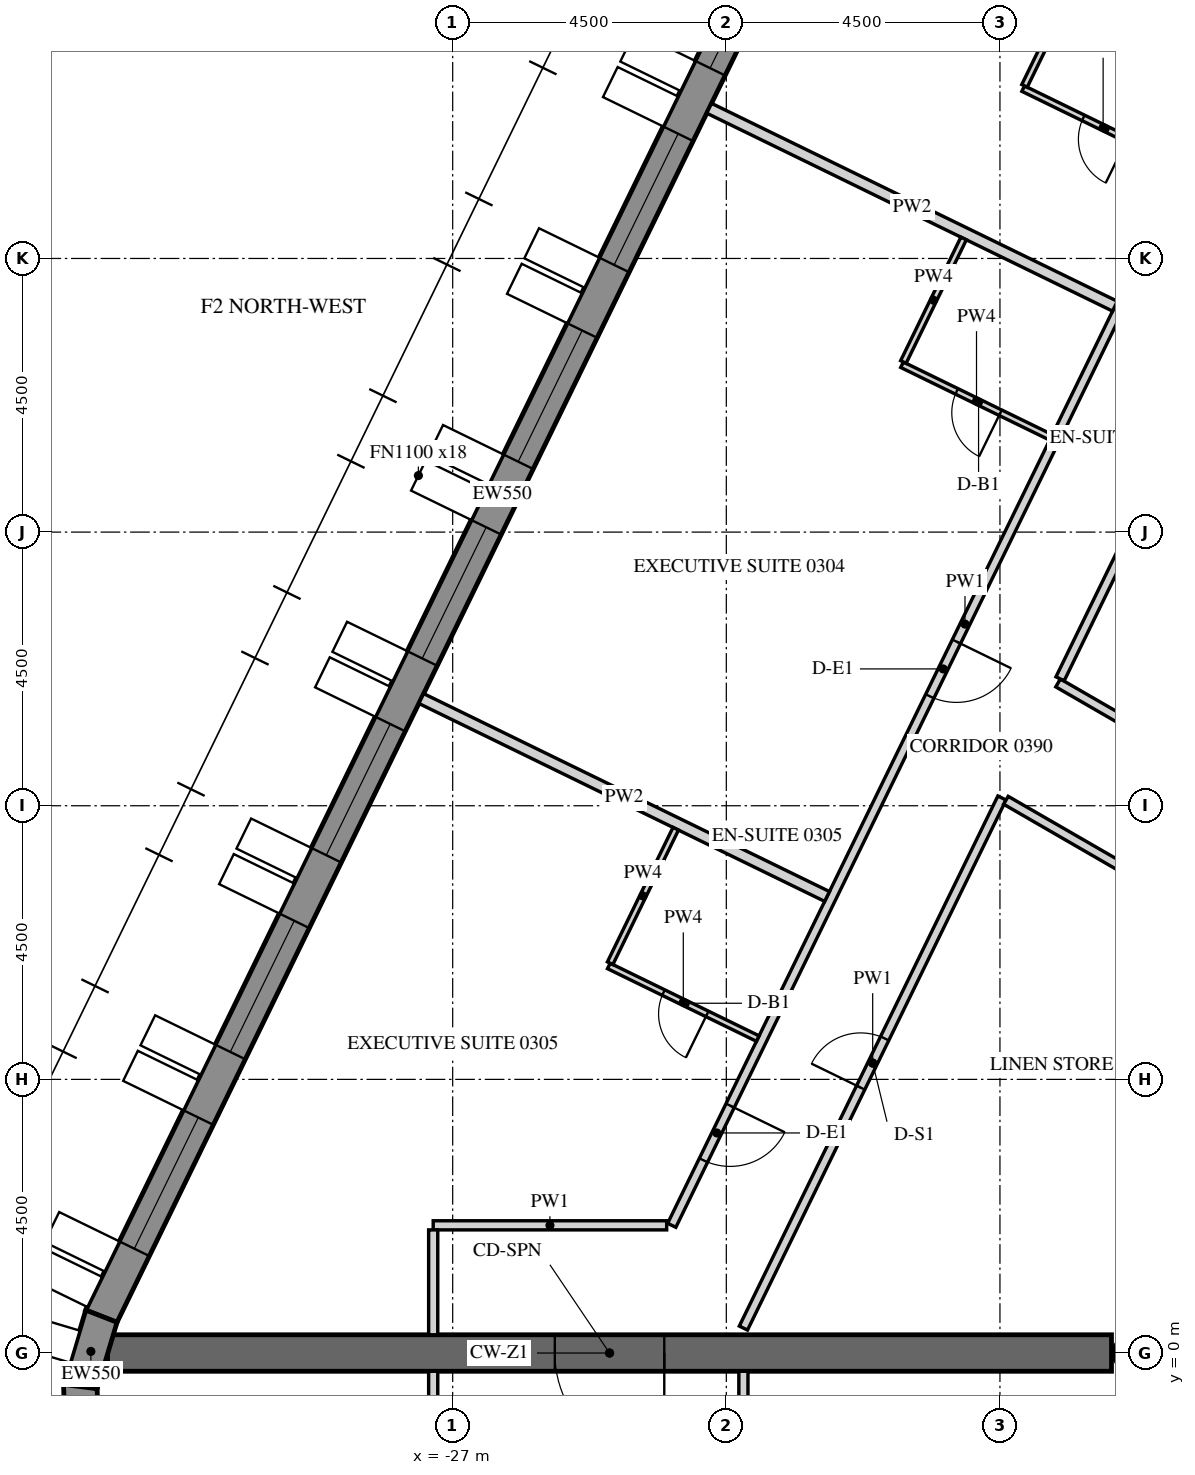
"""IFC4 building model, lengths in metres.
Left out: names, types, materials, properties, quantities, classifications, styles, units other than length and angle.
Written with IfcOpenShell. Run it as: python <this file> out.ifc"""

import sys

from ifc_helpers import new_model, si_unit, direction, frame, frame_2d, origin, place, context, subcontext, project, spatial, polyline, rectangle, outline, extrude, element, fill, save


model = new_model("IFC4")
c1 = context("Model", 3, precision=1e-05, world=origin(), true_north=direction((0.0, 1.0)))
c2 = subcontext(c1, "Body", "Model", "MODEL_VIEW")
j1 = project(units=[si_unit("LENGTHUNIT", "METRE"), si_unit("PLANEANGLEUNIT", "RADIAN")], contexts=[c1])
p1 = place(None, origin())
s1 = spatial("IfcSite", under=j1, at=p1, CompositionType="ELEMENT")
p2 = place(p1, origin())
s2 = spatial("IfcBuilding", under=s1, at=p2, CompositionType="ELEMENT")
p3 = place(p2, frame((0.0, 0.0, 60.9)))
s3 = spatial("IfcBuildingStorey", under=s2, at=p3, CompositionType="ELEMENT", Elevation=60.9)
p4 = place(p3, frame((-19.595, 27.633, -0.15), z_axis=(0.0, 0.0, 1.0), x_axis=(-0.438368285794, -0.898795441694, 0.0)))
e1 = element("IfcWall", 1, at=p4, inside=s3, PredefinedType="SOLIDWALL", context=c2, shape_type="SweptSolid", body=[
    extrude(outline(polyline([(-0.026, -0.275), (30.093, -0.275), (30.048, 0.275), (0.026, 0.275), (-0.026, -0.275)])), origin(), (0.0, 0.0, 1.0), 3.9),
])
p5 = place(p4, frame((1.236, 0.0, 1.05)))
e2 = element("IfcOpeningElement", 2, at=p5, cuts=e1, PredefinedType="OPENING", context=c2, shape_type="SweptSolid", body=[
    extrude(rectangle(XDim=2.4, YDim=2.4, at=frame_2d((1.2, 1.2))), frame((0.0, 0.285, 0.0), z_axis=(0.0, -1.0, 0.0), x_axis=(1.0, 0.0, 0.0)), (0.0, 0.0, 1.0), 0.57),
])
p6 = place(p4, frame((4.835, 0.0, 1.05)))
e3 = element("IfcOpeningElement", 3, at=p6, cuts=e1, PredefinedType="OPENING", context=c2, shape_type="SweptSolid", body=[
    extrude(rectangle(XDim=2.4, YDim=2.4, at=frame_2d((1.2, 1.2))), frame((0.0, 0.285, 0.0), z_axis=(0.0, -1.0, 0.0), x_axis=(1.0, 0.0, 0.0)), (0.0, 0.0, 1.0), 0.57),
])
p7 = place(p4, frame((8.436, 0.0, 1.05)))
e4 = element("IfcOpeningElement", 4, at=p7, cuts=e1, PredefinedType="OPENING", context=c2, shape_type="SweptSolid", body=[
    extrude(rectangle(XDim=2.4, YDim=2.4, at=frame_2d((1.2, 1.2))), frame((0.0, 0.285, 0.0), z_axis=(0.0, -1.0, 0.0), x_axis=(1.0, 0.0, 0.0)), (0.0, 0.0, 1.0), 0.57),
])
p8 = place(p4, frame((12.035, 0.0, 1.05)))
e5 = element("IfcOpeningElement", 5, at=p8, cuts=e1, PredefinedType="OPENING", context=c2, shape_type="SweptSolid", body=[
    extrude(rectangle(XDim=2.4, YDim=2.4, at=frame_2d((1.2, 1.2))), frame((0.0, 0.285, 0.0), z_axis=(0.0, -1.0, 0.0), x_axis=(1.0, 0.0, 0.0)), (0.0, 0.0, 1.0), 0.57),
])
p9 = place(p4, frame((15.635, 0.0, 1.05)))
e6 = element("IfcOpeningElement", 6, at=p9, cuts=e1, PredefinedType="OPENING", context=c2, shape_type="SweptSolid", body=[
    extrude(rectangle(XDim=2.4, YDim=2.4, at=frame_2d((1.2, 1.2))), frame((0.0, 0.285, 0.0), z_axis=(0.0, -1.0, 0.0), x_axis=(1.0, 0.0, 0.0)), (0.0, 0.0, 1.0), 0.57),
])
p10 = place(p4, frame((19.236, 0.0, 1.05)))
e7 = element("IfcOpeningElement", 7, at=p10, cuts=e1, PredefinedType="OPENING", context=c2, shape_type="SweptSolid", body=[
    extrude(rectangle(XDim=2.4, YDim=2.4, at=frame_2d((1.2, 1.2))), frame((0.0, 0.285, 0.0), z_axis=(0.0, -1.0, 0.0), x_axis=(1.0, 0.0, 0.0)), (0.0, 0.0, 1.0), 0.57),
])
p11 = place(p4, frame((22.835, 0.0, 1.05)))
e8 = element("IfcOpeningElement", 8, at=p11, cuts=e1, PredefinedType="OPENING", context=c2, shape_type="SweptSolid", body=[
    extrude(rectangle(XDim=2.4, YDim=2.4, at=frame_2d((1.2, 1.2))), frame((0.0, 0.285, 0.0), z_axis=(0.0, -1.0, 0.0), x_axis=(1.0, 0.0, 0.0)), (0.0, 0.0, 1.0), 0.57),
])
p12 = place(p4, frame((26.436, 0.0, 1.05)))
e9 = element("IfcOpeningElement", 9, at=p12, cuts=e1, PredefinedType="OPENING", context=c2, shape_type="SweptSolid", body=[
    extrude(rectangle(XDim=2.4, YDim=2.4, at=frame_2d((1.2, 1.2))), frame((0.0, 0.285, 0.0), z_axis=(0.0, -1.0, 0.0), x_axis=(1.0, 0.0, 0.0)), (0.0, 0.0, 1.0), 0.57),
])
p13 = place(p3, frame((-32.777, 0.605, -0.15), z_axis=(0.0, 0.0, 1.0), x_axis=(-0.286921497463, -0.957954098219, 0.0)))
e10 = element("IfcWall", 10, at=p13, inside=s3, PredefinedType="SOLIDWALL", context=c2, shape_type="SweptSolid", body=[
    extrude(outline(polyline([(-0.022, -0.275), (1.253, -0.275), (1.163, 0.275), (0.022, 0.275), (-0.022, -0.275)])), origin(), (0.0, 0.0, 1.0), 3.9),
])
p14 = place(p3, frame((-33.124, -0.552, -0.15), z_axis=(0.0, 0.0, 1.0), x_axis=(0.03495638276, -0.999388838893, 0.0)))
e11 = element("IfcWall", 11, at=p14, inside=s3, PredefinedType="SOLIDWALL", context=c2, shape_type="SweptSolid", body=[
    extrude(outline(polyline([(-0.045, -0.275), (1.253, -0.275), (1.163, 0.275), (0.045, 0.275), (-0.045, -0.275)])), origin(), (0.0, 0.0, 1.0), 3.9),
])
p15 = place(p3, frame((-7.91, 13.7, -0.15), z_axis=(0.0, 0.0, 1.0), x_axis=(-0.499999880136, -0.866025472988, 0.0)))
e12 = element("IfcWall", 12, at=p15, inside=s3, PredefinedType="SHEAR", context=c2, shape_type="SweptSolid", body=[
    extrude(outline(polyline([(-0.173, -0.3), (15.993, -0.3), (15.646, 0.3), (0.173, 0.3), (-0.173, -0.3)])), origin(), (0.0, 0.0, 1.0), 3.9),
])
p16 = place(p15, frame((7.039, 0.0, 0.15)))
e13 = element("IfcOpeningElement", 13, at=p16, cuts=e12, PredefinedType="OPENING", context=c2, shape_type="SweptSolid", body=[
    extrude(rectangle(XDim=1.8, YDim=2.4, at=frame_2d((0.9, 1.2))), frame((0.0, 0.31, 0.0), z_axis=(0.0, -1.0, 0.0), x_axis=(1.0, 0.0, 0.0)), (0.0, 0.0, 1.0), 0.62),
])
p17 = place(p3, frame((-15.819, 0.0, -0.15), z_axis=(0.0, 0.0, 1.0), x_axis=(0.499999880136, -0.866025472988, 0.0)))
e14 = element("IfcWall", 14, at=p17, inside=s3, PredefinedType="SHEAR", context=c2, shape_type="SweptSolid", body=[
    extrude(outline(polyline([(-0.173, -0.3), (15.993, -0.3), (15.646, 0.3), (0.173, 0.3), (-0.173, -0.3)])), origin(), (0.0, 0.0, 1.0), 3.9),
])
p18 = place(p17, frame((6.981, 0.0, 0.15)))
e15 = element("IfcOpeningElement", 15, at=p18, cuts=e14, PredefinedType="OPENING", context=c2, shape_type="SweptSolid", body=[
    extrude(rectangle(XDim=1.8, YDim=2.4, at=frame_2d((0.9, 1.2))), frame((0.0, 0.31, 0.0), z_axis=(0.0, -1.0, 0.0), x_axis=(1.0, 0.0, 0.0)), (0.0, 0.0, 1.0), 0.62),
])
p19 = place(p3, frame((-16.166, 0.0, -0.15), z_axis=(0.0, 0.0, 1.0), x_axis=(-1.0, 0.0, 0.0)))
e16 = element("IfcWall", 16, at=p19, inside=s3, PredefinedType="SHEAR", context=c2, shape_type="SweptSolid", body=[
    extrude(rectangle(XDim=16.509, YDim=0.6, at=frame_2d((8.254, 0.0))), origin(), (0.0, 0.0, 1.0), 3.9),
])
p20 = place(p19, frame((7.354, 0.0, 0.15)))
e17 = element("IfcOpeningElement", 17, at=p20, cuts=e16, PredefinedType="OPENING", context=c2, shape_type="SweptSolid", body=[
    extrude(rectangle(XDim=1.8, YDim=2.4, at=frame_2d((0.9, 1.2))), frame((0.0, 0.31, 0.0), z_axis=(0.0, -1.0, 0.0), x_axis=(1.0, 0.0, 0.0)), (0.0, 0.0, 1.0), 0.62),
])
p21 = place(p3, frame((-13.752, 21.875, 0.0), z_axis=(0.0, 0.0, 1.0), x_axis=(-0.438376846054, -0.898791266559, 0.0)))
e18 = element("IfcWall", 18, at=p21, inside=s3, PredefinedType="PARTITIONING", context=c2, shape_type="SweptSolid", body=[
    extrude(rectangle(XDim=22.002, YDim=0.15, at=frame_2d((11.001, 0.0))), origin(), (0.0, 0.0, 1.0), 2.988),
])
p22 = place(p21, frame((3.269, 0.0, 0.0)))
e19 = element("IfcOpeningElement", 19, at=p22, cuts=e18, PredefinedType="OPENING", context=c2, shape_type="SweptSolid", body=[
    extrude(rectangle(XDim=1.0, YDim=2.1, at=frame_2d((0.5, 1.05))), frame((0.0, 0.085, 0.0), z_axis=(0.0, -1.0, 0.0), x_axis=(1.0, 0.0, 0.0)), (0.0, 0.0, 1.0), 0.17),
])
p23 = place(p21, frame((11.321, 0.0, 0.0)))
e20 = element("IfcOpeningElement", 20, at=p23, cuts=e18, PredefinedType="OPENING", context=c2, shape_type="SweptSolid", body=[
    extrude(rectangle(XDim=1.0, YDim=2.1, at=frame_2d((0.5, 1.05))), frame((0.0, 0.085, 0.0), z_axis=(0.0, -1.0, 0.0), x_axis=(1.0, 0.0, 0.0)), (0.0, 0.0, 1.0), 0.17),
])
p24 = place(p21, frame((19.812, 0.0, 0.0)))
e21 = element("IfcOpeningElement", 21, at=p24, cuts=e18, PredefinedType="OPENING", context=c2, shape_type="SweptSolid", body=[
    extrude(rectangle(XDim=1.0, YDim=2.1, at=frame_2d((0.5, 1.05))), frame((0.0, 0.085, 0.0), z_axis=(0.0, -1.0, 0.0), x_axis=(1.0, 0.0, 0.0)), (0.0, 0.0, 1.0), 0.17),
])
p25 = place(p3, frame((-23.481, 2.1, 0.0), z_axis=(0.0, 0.0, 1.0), x_axis=(-1.0, 0.0, 0.0)))
e22 = element("IfcWall", 22, at=p25, inside=s3, PredefinedType="PARTITIONING", context=c2, shape_type="SweptSolid", body=[
    extrude(rectangle(XDim=3.84, YDim=0.15, at=frame_2d((1.92, 0.0))), origin(), (0.0, 0.0, 1.0), 2.988),
])
p26 = place(p3, frame((-27.32, 2.025, 0.0), z_axis=(0.0, 0.0, 1.0), x_axis=(0.0, -1.0, 0.0)))
e23 = element("IfcWall", 23, at=p26, inside=s3, PredefinedType="PARTITIONING", context=c2, shape_type="SweptSolid", body=[
    extrude(rectangle(XDim=1.725, YDim=0.15, at=frame_2d((0.862, 0.0))), origin(), (0.0, 0.0, 1.0), 2.988),
])
p27 = place(p3, frame((-11.614, 7.884, 0.0), z_axis=(0.0, 0.0, 1.0), x_axis=(-0.866025438137, 0.4999999405, 0.0)))
e24 = element("IfcWall", 24, at=p27, inside=s3, PredefinedType="PARTITIONING", context=c2, shape_type="SweptSolid", body=[
    extrude(rectangle(XDim=6.271, YDim=0.15, at=frame_2d((3.135, 0.0))), origin(), (0.0, 0.0, 1.0), 2.988),
])
p28 = place(p3, frame((-17.011, 11.087, 0.0), z_axis=(0.0, 0.0, 1.0), x_axis=(0.43836877185, 0.898795204631, 0.0)))
e25 = element("IfcWall", 25, at=p28, inside=s3, PredefinedType="PARTITIONING", context=c2, shape_type="SweptSolid", body=[
    extrude(rectangle(XDim=10.083, YDim=0.15, at=frame_2d((5.042, 0.0))), origin(), (0.0, 0.0, 1.0), 2.988),
])
p29 = place(p3, frame((-22.219, 0.41, 0.0), z_axis=(0.0, 0.0, 1.0), x_axis=(0.438391891827, 0.898783927972, 0.0)))
e26 = element("IfcWall", 26, at=p29, inside=s3, PredefinedType="PARTITIONING", context=c2, shape_type="SweptSolid", body=[
    extrude(rectangle(XDim=9.699, YDim=0.15, at=frame_2d((4.85, 0.0))), origin(), (0.0, 0.0, 1.0), 2.988),
])
p30 = place(p29, frame((4.4, 0.0, 0.0)))
e27 = element("IfcOpeningElement", 27, at=p30, cuts=e26, PredefinedType="OPENING", context=c2, shape_type="SweptSolid", body=[
    extrude(rectangle(XDim=0.9, YDim=2.1, at=frame_2d((0.45, 1.05))), frame((0.0, 0.085, 0.0), z_axis=(0.0, -1.0, 0.0), x_axis=(1.0, 0.0, 0.0)), (0.0, 0.0, 1.0), 0.17),
])
p31 = place(p3, frame((-17.902, 9.09, 0.0), z_axis=(0.0, 0.0, 1.0), x_axis=(0.866036368755, -0.499981007633, 0.0)))
e28 = element("IfcWall", 28, at=p31, inside=s3, PredefinedType="PARTITIONING", context=c2, shape_type="SweptSolid", body=[
    extrude(rectangle(XDim=6.049, YDim=0.15, at=frame_2d((3.024, 0.0))), origin(), (0.0, 0.0, 1.0), 2.988),
])
p32 = place(p3, frame((-27.32, -0.3, 0.0), z_axis=(0.0, 0.0, 1.0), x_axis=(0.0, -1.0, 0.0)))
e29 = element("IfcWall", 29, at=p32, inside=s3, PredefinedType="PARTITIONING", context=c2, shape_type="SweptSolid", body=[
    extrude(rectangle(XDim=1.8, YDim=0.15, at=frame_2d((0.9, 0.0))), origin(), (0.0, 0.0, 1.0), 2.988),
])
p33 = place(p3, frame((-22.219, -1.666, 0.0), z_axis=(0.0, 0.0, 1.0), x_axis=(0.0, 1.0, 0.0)))
e30 = element("IfcWall", 30, at=p33, inside=s3, PredefinedType="PARTITIONING", context=c2, shape_type="SweptSolid", body=[
    extrude(rectangle(XDim=1.366, YDim=0.15, at=frame_2d((0.683, 0.0))), origin(), (0.0, 0.0, 1.0), 2.988),
])
p34 = place(p3, frame((-14.989, 19.511, 0.0), z_axis=(0.0, 0.0, 1.0), x_axis=(-0.898790906006, 0.438377585285, 0.0)))
e31 = element("IfcWall", 31, at=p34, inside=s3, PredefinedType="PARTITIONING", context=c2, shape_type="SweptSolid", body=[
    extrude(rectangle(XDim=2.925, YDim=0.1, at=frame_2d((1.462, 0.0))), origin(), (0.0, 0.0, 1.0), 2.988),
])
p35 = place(p34, frame((1.025, 0.0, 0.0)))
e32 = element("IfcOpeningElement", 32, at=p35, cuts=e31, PredefinedType="OPENING", context=c2, shape_type="SweptSolid", body=[
    extrude(rectangle(XDim=0.8, YDim=2.1, at=frame_2d((0.4, 1.05))), frame((0.0, 0.06, 0.0), z_axis=(0.0, -1.0, 0.0), x_axis=(1.0, 0.0, 0.0)), (0.0, 0.0, 1.0), 0.12),
])
p36 = place(p3, frame((-17.596, 20.838, 0.0), z_axis=(0.0, 0.0, 1.0), x_axis=(0.438423632021, 0.898768445644, 0.0)))
e33 = element("IfcWall", 33, at=p36, inside=s3, PredefinedType="PARTITIONING", context=c2, shape_type="SweptSolid", body=[
    extrude(rectangle(XDim=2.35, YDim=0.1, at=frame_2d((1.175, 0.0))), origin(), (0.0, 0.0, 1.0), 2.988),
])
p37 = place(p3, frame((-22.782, 20.47, 0.0), z_axis=(0.0, 0.0, 1.0), x_axis=(0.898783297359, -0.438393184697, 0.0)))
e34 = element("IfcWall", 34, at=p37, inside=s3, PredefinedType="PARTITIONING", context=c2, shape_type="SweptSolid", body=[
    extrude(rectangle(XDim=7.425, YDim=0.18, at=frame_2d((3.712, 0.0))), origin(), (0.0, 0.0, 1.0), 2.988),
])
p38 = place(p3, frame((-17.161, 15.058, 0.0), z_axis=(0.0, 0.0, 1.0), x_axis=(-0.898791692788, 0.43837597217, 0.0)))
e35 = element("IfcWall", 35, at=p38, inside=s3, PredefinedType="PARTITIONING", context=c2, shape_type="SweptSolid", body=[
    extrude(rectangle(XDim=2.725, YDim=0.1, at=frame_2d((1.363, 0.0))), origin(), (0.0, 0.0, 1.0), 2.988),
])
p39 = place(p38, frame((0.925, 0.0, 0.0)))
e36 = element("IfcOpeningElement", 36, at=p39, cuts=e35, PredefinedType="OPENING", context=c2, shape_type="SweptSolid", body=[
    extrude(rectangle(XDim=0.8, YDim=2.1, at=frame_2d((0.4, 1.05))), frame((0.0, 0.06, 0.0), z_axis=(0.0, -1.0, 0.0), x_axis=(1.0, 0.0, 0.0)), (0.0, 0.0, 1.0), 0.12),
])
p40 = place(p3, frame((-19.588, 16.297, 0.0), z_axis=(0.0, 0.0, 1.0), x_axis=(0.438376807268, 0.898791285477, 0.0)))
e37 = element("IfcWall", 37, at=p40, inside=s3, PredefinedType="PARTITIONING", context=c2, shape_type="SweptSolid", body=[
    extrude(rectangle(XDim=2.26, YDim=0.1, at=frame_2d((1.13, 0.0))), origin(), (0.0, 0.0, 1.0), 2.988),
])
p41 = place(p3, frame((-27.517, 10.763, 0.0), z_axis=(0.0, 0.0, 1.0), x_axis=(0.898789933843, -0.438379578473, 0.0)))
e38 = element("IfcWall", 38, at=p41, inside=s3, PredefinedType="PARTITIONING", context=c2, shape_type="SweptSolid", body=[
    extrude(rectangle(XDim=7.425, YDim=0.18, at=frame_2d((3.712, 0.0))), origin(), (0.0, 0.0, 1.0), 2.988),
])
p42 = place(p3, frame((-21.983, 5.171, 0.0), z_axis=(0.0, 0.0, 1.0), x_axis=(-0.898791692788, 0.43837597217, 0.0)))
e39 = element("IfcWall", 39, at=p42, inside=s3, PredefinedType="PARTITIONING", context=c2, shape_type="SweptSolid", body=[
    extrude(rectangle(XDim=2.725, YDim=0.1, at=frame_2d((1.363, 0.0))), origin(), (0.0, 0.0, 1.0), 2.988),
])
p43 = place(p42, frame((0.925, 0.0, 0.0)))
e40 = element("IfcOpeningElement", 40, at=p43, cuts=e39, PredefinedType="OPENING", context=c2, shape_type="SweptSolid", body=[
    extrude(rectangle(XDim=0.8, YDim=2.1, at=frame_2d((0.4, 1.05))), frame((0.0, 0.06, 0.0), z_axis=(0.0, -1.0, 0.0), x_axis=(1.0, 0.0, 0.0)), (0.0, 0.0, 1.0), 0.12),
])
p44 = place(p3, frame((-24.41, 6.411, 0.0), z_axis=(0.0, 0.0, 1.0), x_axis=(0.438378657462, 0.89879038306, 0.0)))
e41 = element("IfcWall", 41, at=p44, inside=s3, PredefinedType="PARTITIONING", context=c2, shape_type="SweptSolid", body=[
    extrude(rectangle(XDim=2.46, YDim=0.1, at=frame_2d((1.23, 0.0))), origin(), (0.0, 0.0, 1.0), 2.988),
])
p45 = place(p6, frame((0.0, 0.205, 0.0)))
e42 = element("IfcWindow", 42, at=p45, inside=s3, PartitioningType="DOUBLE_PANEL_VERTICAL", PredefinedType="WINDOW", context=c2, shape_type="SweptSolid", body=[
    extrude(rectangle(XDim=2.4, YDim=2.4, at=frame_2d((1.2, 1.2))), frame((0.0, 0.03, 0.0), z_axis=(0.0, -1.0, 0.0), x_axis=(1.0, 0.0, 0.0)), (0.0, 0.0, 1.0), 0.06),
])
fill(e3, e42)
p46 = place(p7, frame((0.0, 0.205, 0.0)))
e43 = element("IfcWindow", 43, at=p46, inside=s3, PartitioningType="DOUBLE_PANEL_VERTICAL", PredefinedType="WINDOW", context=c2, shape_type="SweptSolid", body=[
    extrude(rectangle(XDim=2.4, YDim=2.4, at=frame_2d((1.2, 1.2))), frame((0.0, 0.03, 0.0), z_axis=(0.0, -1.0, 0.0), x_axis=(1.0, 0.0, 0.0)), (0.0, 0.0, 1.0), 0.06),
])
fill(e4, e43)
p47 = place(p8, frame((0.0, 0.205, 0.0)))
e44 = element("IfcWindow", 44, at=p47, inside=s3, PartitioningType="DOUBLE_PANEL_VERTICAL", PredefinedType="WINDOW", context=c2, shape_type="SweptSolid", body=[
    extrude(rectangle(XDim=2.4, YDim=2.4, at=frame_2d((1.2, 1.2))), frame((0.0, 0.03, 0.0), z_axis=(0.0, -1.0, 0.0), x_axis=(1.0, 0.0, 0.0)), (0.0, 0.0, 1.0), 0.06),
])
fill(e5, e44)
p48 = place(p9, frame((0.0, 0.205, 0.0)))
e45 = element("IfcWindow", 45, at=p48, inside=s3, PartitioningType="DOUBLE_PANEL_VERTICAL", PredefinedType="WINDOW", context=c2, shape_type="SweptSolid", body=[
    extrude(rectangle(XDim=2.4, YDim=2.4, at=frame_2d((1.2, 1.2))), frame((0.0, 0.03, 0.0), z_axis=(0.0, -1.0, 0.0), x_axis=(1.0, 0.0, 0.0)), (0.0, 0.0, 1.0), 0.06),
])
fill(e6, e45)
p49 = place(p10, frame((0.0, 0.205, 0.0)))
e46 = element("IfcWindow", 46, at=p49, inside=s3, PartitioningType="DOUBLE_PANEL_VERTICAL", PredefinedType="WINDOW", context=c2, shape_type="SweptSolid", body=[
    extrude(rectangle(XDim=2.4, YDim=2.4, at=frame_2d((1.2, 1.2))), frame((0.0, 0.03, 0.0), z_axis=(0.0, -1.0, 0.0), x_axis=(1.0, 0.0, 0.0)), (0.0, 0.0, 1.0), 0.06),
])
fill(e7, e46)
p50 = place(p11, frame((0.0, 0.205, 0.0)))
e47 = element("IfcWindow", 47, at=p50, inside=s3, PartitioningType="DOUBLE_PANEL_VERTICAL", PredefinedType="WINDOW", context=c2, shape_type="SweptSolid", body=[
    extrude(rectangle(XDim=2.4, YDim=2.4, at=frame_2d((1.2, 1.2))), frame((0.0, 0.03, 0.0), z_axis=(0.0, -1.0, 0.0), x_axis=(1.0, 0.0, 0.0)), (0.0, 0.0, 1.0), 0.06),
])
fill(e8, e47)
p51 = place(p12, frame((0.0, 0.205, 0.0)))
e48 = element("IfcWindow", 48, at=p51, inside=s3, PartitioningType="DOUBLE_PANEL_VERTICAL", PredefinedType="WINDOW", context=c2, shape_type="SweptSolid", body=[
    extrude(rectangle(XDim=2.4, YDim=2.4, at=frame_2d((1.2, 1.2))), frame((0.0, 0.03, 0.0), z_axis=(0.0, -1.0, 0.0), x_axis=(1.0, 0.0, 0.0)), (0.0, 0.0, 1.0), 0.06),
])
fill(e9, e48)
p52 = place(p20, origin())
e49 = element("IfcDoor", 49, at=p52, inside=s3, OperationType="DOUBLE_DOOR_SINGLE_SWING", PredefinedType="DOOR", context=c2, shape_type="SweptSolid", body=[
    extrude(rectangle(XDim=1.8, YDim=2.4, at=frame_2d((0.9, 1.2))), frame((0.0, 0.025, 0.0), z_axis=(0.0, -1.0, 0.0), x_axis=(1.0, 0.0, 0.0)), (0.0, 0.0, 1.0), 0.05),
])
fill(e17, e49)
p53 = place(p35, origin())
e50 = element("IfcDoor", 50, at=p53, inside=s3, OperationType="SINGLE_SWING_RIGHT", PredefinedType="DOOR", context=c2, shape_type="SweptSolid", body=[
    extrude(rectangle(XDim=0.8, YDim=2.1, at=frame_2d((0.4, 1.05))), frame((0.0, 0.025, 0.0), z_axis=(0.0, -1.0, 0.0), x_axis=(1.0, 0.0, 0.0)), (0.0, 0.0, 1.0), 0.05),
])
fill(e32, e50)
p54 = place(p23, origin())
e51 = element("IfcDoor", 51, at=p54, inside=s3, OperationType="SINGLE_SWING_LEFT", PredefinedType="DOOR", context=c2, shape_type="SweptSolid", body=[
    extrude(rectangle(XDim=1.0, YDim=2.1, at=frame_2d((0.5, 1.05))), frame((0.0, 0.025, 0.0), z_axis=(0.0, -1.0, 0.0), x_axis=(1.0, 0.0, 0.0)), (0.0, 0.0, 1.0), 0.05),
])
fill(e20, e51)
p55 = place(p39, origin())
e52 = element("IfcDoor", 52, at=p55, inside=s3, OperationType="SINGLE_SWING_RIGHT", PredefinedType="DOOR", context=c2, shape_type="SweptSolid", body=[
    extrude(rectangle(XDim=0.8, YDim=2.1, at=frame_2d((0.4, 1.05))), frame((0.0, 0.025, 0.0), z_axis=(0.0, -1.0, 0.0), x_axis=(1.0, 0.0, 0.0)), (0.0, 0.0, 1.0), 0.05),
])
fill(e36, e52)
p56 = place(p24, origin())
e53 = element("IfcDoor", 53, at=p56, inside=s3, OperationType="SINGLE_SWING_RIGHT", PredefinedType="DOOR", context=c2, shape_type="SweptSolid", body=[
    extrude(rectangle(XDim=1.0, YDim=2.1, at=frame_2d((0.5, 1.05))), frame((0.0, 0.025, 0.0), z_axis=(0.0, -1.0, 0.0), x_axis=(1.0, 0.0, 0.0)), (0.0, 0.0, 1.0), 0.05),
])
fill(e21, e53)
p57 = place(p43, origin())
e54 = element("IfcDoor", 54, at=p57, inside=s3, OperationType="SINGLE_SWING_RIGHT", PredefinedType="DOOR", context=c2, shape_type="SweptSolid", body=[
    extrude(rectangle(XDim=0.8, YDim=2.1, at=frame_2d((0.4, 1.05))), frame((0.0, 0.025, 0.0), z_axis=(0.0, -1.0, 0.0), x_axis=(1.0, 0.0, 0.0)), (0.0, 0.0, 1.0), 0.05),
])
fill(e40, e54)
p58 = place(p30, origin())
e55 = element("IfcDoor", 55, at=p58, inside=s3, OperationType="SINGLE_SWING_LEFT", PredefinedType="DOOR", context=c2, shape_type="SweptSolid", body=[
    extrude(rectangle(XDim=0.9, YDim=2.1, at=frame_2d((0.45, 1.05))), frame((0.0, 0.025, 0.0), z_axis=(0.0, -1.0, 0.0), x_axis=(1.0, 0.0, 0.0)), (0.0, 0.0, 1.0), 0.05),
])
fill(e27, e55)
save(model, sys.argv[1])
